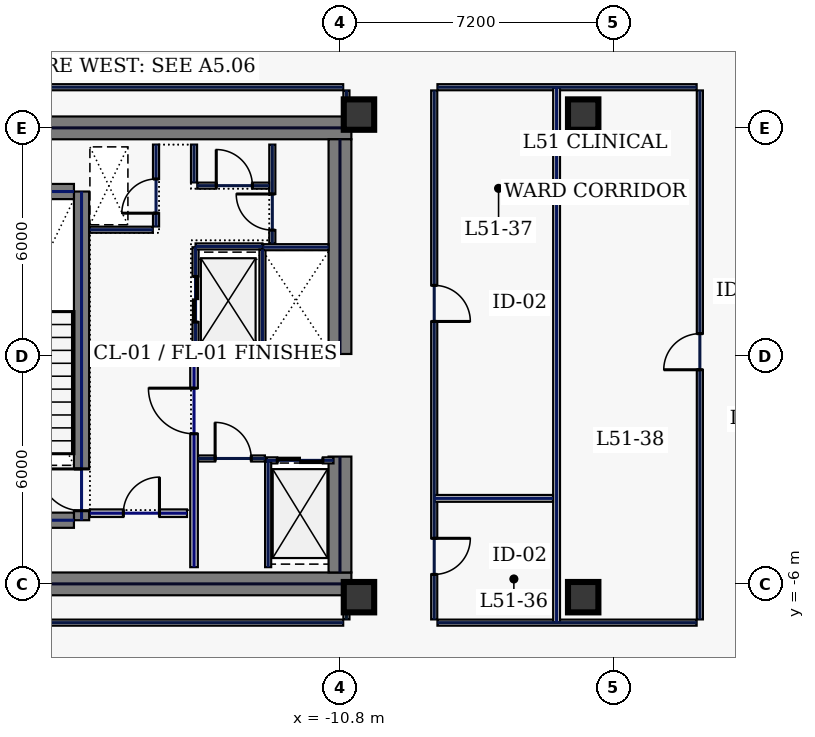
"""IFC4 building model, lengths in metres.
Left out: names, types, materials, properties, quantities, classifications, styles, units other than length and angle.
Written with IfcOpenShell. Run it as: python <this file> out.ifc"""

import sys

from ifc_helpers import new_model, si_unit, direction, frame, frame_2d, origin, origin_2d, place, context, subcontext, project, spatial, rectangle, hollow_rectangle, extrude, element, fill, save


model = new_model("IFC4")
c1 = context("Model", 3, precision=1e-05, world=origin(), true_north=direction((0.0, 1.0)))
c2 = subcontext(c1, "Body", "Model", "MODEL_VIEW")
j1 = project(units=[si_unit("LENGTHUNIT", "METRE"), si_unit("PLANEANGLEUNIT", "RADIAN")], contexts=[c1])
p1 = place(None, origin())
s1 = spatial("IfcSite", under=j1, at=p1, CompositionType="ELEMENT")
p2 = place(p1, origin())
s2 = spatial("IfcBuilding", under=s1, at=p2, CompositionType="ELEMENT")
p3 = place(p2, frame((0.0, 0.0, 222.2)))
s3 = spatial("IfcBuildingStorey", under=s2, at=p3, CompositionType="ELEMENT", Elevation=222.2)
for number, where, z_axis, x_axis in (
    (1, (-22.0, 6.0, 0.0), (0.0, 0.0, 1.0), (1.0, 0.0, 0.0)),
    (2, (-22.0, -6.0, 0.0), (0.0, 0.0, 1.0), (1.0, 0.0, 0.0)),
):
    element("IfcWall", number, at=place(p3, frame(where, z_axis=z_axis, x_axis=x_axis)), inside=s3, PredefinedType="SHEAR", context=c2, shape_type="SweptSolid", body=[
        extrude(rectangle(XDim=11.5, YDim=0.6, at=frame_2d((5.75, 0.0))), origin(), (0.0, 0.0, 1.0), 3.74),
    ])
p4 = place(p3, frame((-10.8, -5.7, 0.0), z_axis=(0.0, 0.0, 1.0), x_axis=(0.0, 1.0, 0.0)))
e3 = element("IfcWall", 3, at=p4, inside=s3, PredefinedType="SHEAR", context=c2, shape_type="SweptSolid", body=[
    extrude(rectangle(XDim=3.05, YDim=0.6, at=frame_2d((1.525, 0.0))), origin(), (0.0, 0.0, 1.0), 3.74),
])
p5 = place(p3, frame((-10.8, 0.05, 0.0), z_axis=(0.0, 0.0, 1.0), x_axis=(0.0, 1.0, 0.0)))
e4 = element("IfcWall", 4, at=p5, inside=s3, PredefinedType="SHEAR", context=c2, shape_type="SweptSolid", body=[
    extrude(rectangle(XDim=5.65, YDim=0.6, at=frame_2d((2.825, 0.0))), origin(), (0.0, 0.0, 1.0), 3.74),
])
p6 = place(p3, frame((-17.6, -4.325, 0.0), z_axis=(0.0, 0.0, 1.0), x_axis=(0.0, 1.0, 0.0)))
e5 = element("IfcWall", 5, at=p6, inside=s3, PredefinedType="SHEAR", context=c2, shape_type="SweptSolid", body=[
    extrude(rectangle(XDim=8.65, YDim=0.4, at=frame_2d((4.325, 0.0))), origin(), (0.0, 0.0, 1.0), 3.74),
])
p7 = place(p6, frame((0.25, 0.0, 0.0)))
e6 = element("IfcOpeningElement", 6, at=p7, cuts=e5, PredefinedType="OPENING", context=c2, shape_type="SweptSolid", body=[
    extrude(rectangle(XDim=1.1, YDim=2.2, at=frame_2d((0.55, 1.1))), frame((0.0, 0.21, 0.0), z_axis=(0.0, -1.0, 0.0), x_axis=(1.0, 0.0, 0.0)), (0.0, 0.0, 1.0), 0.42),
])
for number, where, z_axis, x_axis in (
    (7, (-21.2, -4.325, 0.0), (0.0, 0.0, 1.0), (1.0, 0.0, 0.0)),
    (8, (-21.2, 4.325, 0.0), (0.0, 0.0, 1.0), (1.0, 0.0, 0.0)),
):
    element("IfcWall", number, at=place(p3, frame(where, z_axis=z_axis, x_axis=x_axis)), inside=s3, PredefinedType="SHEAR", context=c2, shape_type="SweptSolid", body=[
        extrude(rectangle(XDim=3.4, YDim=0.4, at=frame_2d((1.7, 0.0))), origin(), (0.0, 0.0, 1.0), 3.74),
    ])
for number, where, z_axis, x_axis in (
    (9, (-10.3, -6.35, 0.0), (0.0, 0.0, 1.0), (1.0, 0.0, 0.0)),
    (10, (-10.3, 6.35, 0.0), (0.0, 0.0, 1.0), (1.0, 0.0, 0.0)),
    (11, (-4.4, -6.35, 0.0), (0.0, 0.0, 1.0), (1.0, 0.0, 0.0)),
    (12, (-4.4, 6.35, 0.0), (0.0, 0.0, 1.0), (1.0, 0.0, 0.0)),
):
    element("IfcColumn", number, at=place(p3, frame(where, z_axis=z_axis, x_axis=x_axis)), inside=s3, PredefinedType="COLUMN", context=c2, shape_type="SweptSolid", body=[
        extrude(hollow_rectangle(XDim=0.8, YDim=0.8, WallThickness=0.036, at=origin_2d()), origin(), (0.0, 0.0, 1.0), 3.74),
    ])
p8 = place(p3, frame((-14.6, 0.12, 0.0), z_axis=(0.0, 0.0, 1.0), x_axis=(0.0, 1.0, 0.0)))
e13 = element("IfcWall", 13, at=p8, inside=s3, PredefinedType="PARTITIONING", context=c2, shape_type="SweptSolid", body=[
    extrude(rectangle(XDim=2.74, YDim=0.16, at=frame_2d((1.37, 0.0))), origin(), (0.0, 0.0, 1.0), 3.74),
])
p9 = place(p8, frame((0.77, 0.0, 0.0)))
e14 = element("IfcOpeningElement", 14, at=p9, cuts=e13, PredefinedType="OPENING", context=c2, shape_type="SweptSolid", body=[
    extrude(rectangle(XDim=1.2, YDim=2.2, at=frame_2d((0.6, 1.1))), frame((0.0, 0.09, 0.0), z_axis=(0.0, -1.0, 0.0), x_axis=(1.0, 0.0, 0.0)), (0.0, 0.0, 1.0), 0.18),
])
for number, where, z_axis, x_axis in (
    (15, (-14.6, 0.1, 0.0), (0.0, 0.0, 1.0), (1.0, 0.0, 0.0)),
    (16, (-14.6, 2.88, 0.0), (0.0, 0.0, 1.0), (1.0, 0.0, 0.0)),
):
    element("IfcWall", number, at=place(p3, frame(where, z_axis=z_axis, x_axis=x_axis)), inside=s3, PredefinedType="PARTITIONING", context=c2, shape_type="SweptSolid", body=[
        extrude(rectangle(XDim=1.76, YDim=0.16, at=frame_2d((0.88, 0.0))), origin(), (0.0, 0.0, 1.0), 3.74),
    ])
p10 = place(p3, frame((-12.84, 0.18, 0.0), z_axis=(0.0, 0.0, 1.0), x_axis=(0.0, 1.0, 0.0)))
e17 = element("IfcWall", 17, at=p10, inside=s3, PredefinedType="PARTITIONING", context=c2, shape_type="SweptSolid", body=[
    extrude(rectangle(XDim=2.62, YDim=0.16, at=frame_2d((1.31, 0.0))), origin(), (0.0, 0.0, 1.0), 3.74),
])
p11 = place(p3, frame((-12.73, -2.75, 0.0), z_axis=(0.0, 0.0, 1.0), x_axis=(1.0, 0.0, 0.0)))
e18 = element("IfcWall", 18, at=p11, inside=s3, PredefinedType="PARTITIONING", context=c2, shape_type="SweptSolid", body=[
    extrude(rectangle(XDim=1.76, YDim=0.16, at=frame_2d((0.88, 0.0))), origin(), (0.0, 0.0, 1.0), 3.74),
])
p12 = place(p11, frame((0.28, 0.0, 0.0)))
e19 = element("IfcOpeningElement", 19, at=p12, cuts=e18, PredefinedType="OPENING", context=c2, shape_type="SweptSolid", body=[
    extrude(rectangle(XDim=1.2, YDim=2.2, at=frame_2d((0.6, 1.1))), frame((0.0, 0.09, 0.0), z_axis=(0.0, -1.0, 0.0), x_axis=(1.0, 0.0, 0.0)), (0.0, 0.0, 1.0), 0.18),
])
for number, where, z_axis, x_axis in (
    (20, (-12.82, 0.06, 0.0), (0.0, 0.0, 1.0), (1.0, 0.0, 0.0)),
    (21, (-12.82, 2.86, 0.0), (0.0, 0.0, 1.0), (1.0, 0.0, 0.0)),
):
    element("IfcWall", number, at=place(p3, frame(where, z_axis=z_axis, x_axis=x_axis)), inside=s3, PredefinedType="PARTITIONING", context=c2, shape_type="SweptSolid", body=[
        extrude(rectangle(XDim=1.72, YDim=0.16, at=frame_2d((0.86, 0.0))), origin(), (0.0, 0.0, 1.0), 3.74),
    ])
p13 = place(p3, frame((-15.64, 3.405, 0.0), z_axis=(0.0, 0.0, 1.0), x_axis=(0.0, 1.0, 0.0)))
e22 = element("IfcWall", 22, at=p13, inside=s3, PredefinedType="PARTITIONING", context=c2, shape_type="SweptSolid", body=[
    extrude(rectangle(XDim=2.155, YDim=0.16, at=frame_2d((1.078, 0.0))), origin(), (0.0, 0.0, 1.0), 3.74),
])
p14 = place(p13, frame((0.35, 0.0, 0.0)))
e23 = element("IfcOpeningElement", 23, at=p14, cuts=e22, PredefinedType="OPENING", context=c2, shape_type="SweptSolid", body=[
    extrude(rectangle(XDim=0.9, YDim=2.2, at=frame_2d((0.45, 1.1))), frame((0.0, 0.09, 0.0), z_axis=(0.0, -1.0, 0.0), x_axis=(1.0, 0.0, 0.0)), (0.0, 0.0, 1.0), 0.18),
])
p15 = place(p3, frame((-17.38, 3.32, 0.0), z_axis=(0.0, 0.0, 1.0), x_axis=(1.0, 0.0, 0.0)))
e24 = element("IfcWall", 24, at=p15, inside=s3, PredefinedType="PARTITIONING", context=c2, shape_type="SweptSolid", body=[
    extrude(rectangle(XDim=1.655, YDim=0.16, at=frame_2d((0.827, 0.0))), origin(), (0.0, 0.0, 1.0), 3.74),
])
p16 = place(p3, frame((-17.38, -4.14, 0.0), z_axis=(0.0, 0.0, 1.0), x_axis=(1.0, 0.0, 0.0)))
e25 = element("IfcWall", 25, at=p16, inside=s3, PredefinedType="SOLIDWALL", context=c2, shape_type="SweptSolid", body=[
    extrude(rectangle(XDim=2.555, YDim=0.2, at=frame_2d((1.277, 0.0))), origin(), (0.0, 0.0, 1.0), 3.74),
])
p17 = place(p16, frame((0.88, 0.0, 0.0)))
e26 = element("IfcOpeningElement", 26, at=p17, cuts=e25, PredefinedType="OPENING", context=c2, shape_type="SweptSolid", body=[
    extrude(rectangle(XDim=0.95, YDim=2.2, at=frame_2d((0.475, 1.1))), frame((0.0, 0.11, 0.0), z_axis=(0.0, -1.0, 0.0), x_axis=(1.0, 0.0, 0.0)), (0.0, 0.0, 1.0), 0.22),
])
p18 = place(p3, frame((-14.535, -2.7, 0.0), z_axis=(0.0, 0.0, 1.0), x_axis=(1.0, 0.0, 0.0)))
e27 = element("IfcWall", 27, at=p18, inside=s3, PredefinedType="PARTITIONING", context=c2, shape_type="SweptSolid", body=[
    extrude(rectangle(XDim=1.76, YDim=0.16, at=frame_2d((0.88, 0.0))), origin(), (0.0, 0.0, 1.0), 3.74),
])
p19 = place(p18, frame((0.45, 0.0, 0.0)))
e28 = element("IfcOpeningElement", 28, at=p19, cuts=e27, PredefinedType="OPENING", context=c2, shape_type="SweptSolid", body=[
    extrude(rectangle(XDim=0.95, YDim=2.2, at=frame_2d((0.475, 1.1))), frame((0.0, 0.09, 0.0), z_axis=(0.0, -1.0, 0.0), x_axis=(1.0, 0.0, 0.0)), (0.0, 0.0, 1.0), 0.18),
])
p20 = place(p3, frame((-12.69, -5.56, 0.0), z_axis=(0.0, 0.0, 1.0), x_axis=(0.0, 1.0, 0.0)))
e29 = element("IfcWall", 29, at=p20, inside=s3, PredefinedType="PARTITIONING", context=c2, shape_type="SweptSolid", body=[
    extrude(rectangle(XDim=2.775, YDim=0.16, at=frame_2d((1.388, 0.0))), origin(), (0.0, 0.0, 1.0), 3.74),
])
p21 = place(p3, frame((-12.58, 2.96, 0.0), z_axis=(0.0, 0.0, 1.0), x_axis=(0.0, 1.0, 0.0)))
e30 = element("IfcWall", 30, at=p21, inside=s3, PredefinedType="PARTITIONING", context=c2, shape_type="SweptSolid", body=[
    extrude(rectangle(XDim=2.6, YDim=0.16, at=frame_2d((1.3, 0.0))), origin(), (0.0, 0.0, 1.0), 3.74),
])
p22 = place(p21, frame((0.35, 0.0, 0.0)))
e31 = element("IfcOpeningElement", 31, at=p22, cuts=e30, PredefinedType="OPENING", context=c2, shape_type="SweptSolid", body=[
    extrude(rectangle(XDim=0.95, YDim=2.2, at=frame_2d((0.475, 1.1))), frame((0.0, 0.09, 0.0), z_axis=(0.0, -1.0, 0.0), x_axis=(1.0, 0.0, 0.0)), (0.0, 0.0, 1.0), 0.18),
])
p23 = place(p3, frame((-14.555, 4.48, 0.0), z_axis=(0.0, 0.0, 1.0), x_axis=(1.0, 0.0, 0.0)))
e32 = element("IfcWall", 32, at=p23, inside=s3, PredefinedType="PARTITIONING", context=c2, shape_type="SweptSolid", body=[
    extrude(rectangle(XDim=1.89, YDim=0.16, at=frame_2d((0.945, 0.0))), origin(), (0.0, 0.0, 1.0), 3.74),
])
p24 = place(p23, frame((0.5, 0.0, 0.0)))
e33 = element("IfcOpeningElement", 33, at=p24, cuts=e32, PredefinedType="OPENING", context=c2, shape_type="SweptSolid", body=[
    extrude(rectangle(XDim=0.95, YDim=2.2, at=frame_2d((0.475, 1.1))), frame((0.0, 0.09, 0.0), z_axis=(0.0, -1.0, 0.0), x_axis=(1.0, 0.0, 0.0)), (0.0, 0.0, 1.0), 0.18),
])
p25 = place(p3, frame((-14.64, 4.565, 0.0), z_axis=(0.0, 0.0, 1.0), x_axis=(0.0, 1.0, 0.0)))
e34 = element("IfcWall", 34, at=p25, inside=s3, PredefinedType="PARTITIONING", context=c2, shape_type="SweptSolid", body=[
    extrude(rectangle(XDim=0.995, YDim=0.16, at=frame_2d((0.498, 0.0))), origin(), (0.0, 0.0, 1.0), 3.74),
])
p26 = place(p3, frame((-14.64, -5.56, 0.0), z_axis=(0.0, 0.0, 1.0), x_axis=(0.0, 1.0, 0.0)))
e35 = element("IfcWall", 35, at=p26, inside=s3, PredefinedType="SOLIDWALL", context=c2, shape_type="SweptSolid", body=[
    extrude(rectangle(XDim=5.6, YDim=0.2, at=frame_2d((2.8, 0.0))), origin(), (0.0, 0.0, 1.0), 3.74),
])
p27 = place(p26, frame((3.51, 0.0, 0.0)))
e36 = element("IfcOpeningElement", 36, at=p27, cuts=e35, PredefinedType="OPENING", context=c2, shape_type="SweptSolid", body=[
    extrude(rectangle(XDim=1.2, YDim=2.2, at=frame_2d((0.6, 1.1))), frame((0.0, 0.11, 0.0), z_axis=(0.0, -1.0, 0.0), x_axis=(1.0, 0.0, 0.0)), (0.0, 0.0, 1.0), 0.22),
])
p28 = place(p3, frame((-24.815, -7.02, 0.0), z_axis=(0.0, 0.0, 1.0), x_axis=(1.0, 0.0, 0.0)))
e37 = element("IfcWall", 37, at=p28, inside=s3, PredefinedType="PARTITIONING", context=c2, shape_type="SweptSolid", body=[
    extrude(rectangle(XDim=14.1, YDim=0.16, at=frame_2d((7.05, 0.0))), origin(), (0.0, 0.0, 1.0), 3.74),
])
p29 = place(p3, frame((-10.63, -6.935, 0.0), z_axis=(0.0, 0.0, 1.0), x_axis=(0.0, 1.0, 0.0)))
e38 = element("IfcWall", 38, at=p29, inside=s3, PredefinedType="PARTITIONING", context=c2, shape_type="SweptSolid", body=[
    extrude(rectangle(XDim=0.515, YDim=0.16, at=frame_2d((0.258, 0.0))), origin(), (0.0, 0.0, 1.0), 1.535),
])
p30 = place(p3, frame((-10.63, 6.42, 0.0), z_axis=(0.0, 0.0, 1.0), x_axis=(0.0, 1.0, 0.0)))
e39 = element("IfcWall", 39, at=p30, inside=s3, PredefinedType="PARTITIONING", context=c2, shape_type="SweptSolid", body=[
    extrude(rectangle(XDim=0.565, YDim=0.16, at=frame_2d((0.283, 0.0))), origin(), (0.0, 0.0, 1.0), 3.74),
])
p31 = place(p3, frame((-10.715, 7.07, 0.0), z_axis=(0.0, 0.0, 1.0), x_axis=(-1.0, 0.0, 0.0)))
e40 = element("IfcWall", 40, at=p31, inside=s3, PredefinedType="PARTITIONING", context=c2, shape_type="SweptSolid", body=[
    extrude(rectangle(XDim=14.1, YDim=0.16, at=frame_2d((7.05, 0.0))), origin(), (0.0, 0.0, 1.0), 3.74),
])
p32 = place(p3, frame((-1.33, -6.935, 0.0), z_axis=(0.0, 0.0, 1.0), x_axis=(0.0, 1.0, 0.0)))
e41 = element("IfcWall", 41, at=p32, inside=s3, PredefinedType="PARTITIONING", context=c2, shape_type="SweptSolid", body=[
    extrude(rectangle(XDim=13.92, YDim=0.16, at=frame_2d((6.96, 0.0))), origin(), (0.0, 0.0, 1.0), 3.74),
])
p33 = place(p32, frame((6.57, 0.0, 0.0)))
e42 = element("IfcOpeningElement", 42, at=p33, cuts=e41, PredefinedType="OPENING", context=c2, shape_type="SweptSolid", body=[
    extrude(rectangle(XDim=0.95, YDim=2.2, at=frame_2d((0.475, 1.1))), frame((0.0, 0.09, 0.0), z_axis=(0.0, -1.0, 0.0), x_axis=(1.0, 0.0, 0.0)), (0.0, 0.0, 1.0), 0.18),
])
p34 = place(p3, frame((-1.415, 7.07, 0.0), z_axis=(0.0, 0.0, 1.0), x_axis=(-1.0, 0.0, 0.0)))
e43 = element("IfcWall", 43, at=p34, inside=s3, PredefinedType="PARTITIONING", context=c2, shape_type="SweptSolid", body=[
    extrude(rectangle(XDim=6.82, YDim=0.16, at=frame_2d((3.41, 0.0))), origin(), (0.0, 0.0, 1.0), 3.74),
])
p35 = place(p3, frame((-8.32, 6.985, 0.0), z_axis=(0.0, 0.0, 1.0), x_axis=(0.0, -1.0, 0.0)))
e44 = element("IfcWall", 44, at=p35, inside=s3, PredefinedType="PARTITIONING", context=c2, shape_type="SweptSolid", body=[
    extrude(rectangle(XDim=13.92, YDim=0.16, at=frame_2d((6.96, 0.0))), origin(), (0.0, 0.0, 1.0), 3.74),
])
p36 = place(p35, frame((11.786, 0.0, 0.0)))
e45 = element("IfcOpeningElement", 45, at=p36, cuts=e44, PredefinedType="OPENING", context=c2, shape_type="SweptSolid", body=[
    extrude(rectangle(XDim=0.95, YDim=2.2, at=frame_2d((0.475, 1.1))), frame((0.0, 0.09, 0.0), z_axis=(0.0, -1.0, 0.0), x_axis=(1.0, 0.0, 0.0)), (0.0, 0.0, 1.0), 0.18),
])
p37 = place(p35, frame((5.129, 0.0, 0.0)))
e46 = element("IfcOpeningElement", 46, at=p37, cuts=e44, PredefinedType="OPENING", context=c2, shape_type="SweptSolid", body=[
    extrude(rectangle(XDim=0.95, YDim=2.2, at=frame_2d((0.475, 1.1))), frame((0.0, 0.09, 0.0), z_axis=(0.0, -1.0, 0.0), x_axis=(1.0, 0.0, 0.0)), (0.0, 0.0, 1.0), 0.18),
])
p38 = place(p3, frame((-8.235, -7.02, 0.0), z_axis=(0.0, 0.0, 1.0), x_axis=(1.0, 0.0, 0.0)))
e47 = element("IfcWall", 47, at=p38, inside=s3, PredefinedType="PARTITIONING", context=c2, shape_type="SweptSolid", body=[
    extrude(rectangle(XDim=6.82, YDim=0.16, at=frame_2d((3.41, 0.0))), origin(), (0.0, 0.0, 1.0), 3.74),
])
p39 = place(p3, frame((-5.1, -7.015, 0.0), z_axis=(0.0, 0.0, 1.0), x_axis=(0.0, 1.0, 0.0)))
e48 = element("IfcWall", 48, at=p39, inside=s3, PredefinedType="PARTITIONING", context=c2, shape_type="SweptSolid", body=[
    extrude(rectangle(XDim=14.08, YDim=0.18, at=frame_2d((7.04, 0.0))), origin(), (0.0, 0.0, 1.0), 3.74),
])
p40 = place(p3, frame((-8.315, -3.75, 0.0), z_axis=(0.0, 0.0, 1.0), x_axis=(1.0, 0.0, 0.0)))
e49 = element("IfcWall", 49, at=p40, inside=s3, PredefinedType="PARTITIONING", context=c2, shape_type="SweptSolid", body=[
    extrude(rectangle(XDim=3.12, YDim=0.18, at=frame_2d((1.56, 0.0))), origin(), (0.0, 0.0, 1.0), 3.74),
])
p41 = place(p7, origin())
e50 = element("IfcDoor", 50, at=p41, inside=s3, OperationType="SINGLE_SWING_RIGHT", PredefinedType="DOOR", context=c2, shape_type="SweptSolid", body=[
    extrude(rectangle(XDim=1.1, YDim=2.2, at=frame_2d((0.55, 1.1))), frame((0.0, 0.025, 0.0), z_axis=(0.0, -1.0, 0.0), x_axis=(1.0, 0.0, 0.0)), (0.0, 0.0, 1.0), 0.05),
])
fill(e6, e50)
p42 = place(p9, origin())
e51 = element("IfcDoor", 51, at=p42, inside=s3, OperationType="SLIDING_TO_LEFT", PredefinedType="DOOR", context=c2, shape_type="SweptSolid", body=[
    extrude(rectangle(XDim=1.2, YDim=2.2, at=frame_2d((0.6, 1.1))), frame((0.0, 0.025, 0.0), z_axis=(0.0, -1.0, 0.0), x_axis=(1.0, 0.0, 0.0)), (0.0, 0.0, 1.0), 0.05),
])
fill(e14, e51)
p43 = place(p12, origin())
e52 = element("IfcDoor", 52, at=p43, inside=s3, OperationType="SLIDING_TO_LEFT", PredefinedType="DOOR", context=c2, shape_type="SweptSolid", body=[
    extrude(rectangle(XDim=1.2, YDim=2.2, at=frame_2d((0.6, 1.1))), frame((0.0, 0.025, 0.0), z_axis=(0.0, -1.0, 0.0), x_axis=(1.0, 0.0, 0.0)), (0.0, 0.0, 1.0), 0.05),
])
fill(e19, e52)
p44 = place(p14, origin())
e53 = element("IfcDoor", 53, at=p44, inside=s3, OperationType="SINGLE_SWING_LEFT", PredefinedType="DOOR", context=c2, shape_type="SweptSolid", body=[
    extrude(rectangle(XDim=0.9, YDim=2.2, at=frame_2d((0.45, 1.1))), frame((0.0, 0.025, 0.0), z_axis=(0.0, -1.0, 0.0), x_axis=(1.0, 0.0, 0.0)), (0.0, 0.0, 1.0), 0.05),
])
fill(e23, e53)
p45 = place(p17, origin())
e54 = element("IfcDoor", 54, at=p45, inside=s3, OperationType="SINGLE_SWING_RIGHT", PredefinedType="DOOR", context=c2, shape_type="SweptSolid", body=[
    extrude(rectangle(XDim=0.95, YDim=2.2, at=frame_2d((0.475, 1.1))), frame((0.0, 0.025, 0.0), z_axis=(0.0, -1.0, 0.0), x_axis=(1.0, 0.0, 0.0)), (0.0, 0.0, 1.0), 0.05),
])
fill(e26, e54)
p46 = place(p19, origin())
e55 = element("IfcDoor", 55, at=p46, inside=s3, OperationType="SINGLE_SWING_LEFT", PredefinedType="DOOR", context=c2, shape_type="SweptSolid", body=[
    extrude(rectangle(XDim=0.95, YDim=2.2, at=frame_2d((0.475, 1.1))), frame((0.0, 0.025, 0.0), z_axis=(0.0, -1.0, 0.0), x_axis=(1.0, 0.0, 0.0)), (0.0, 0.0, 1.0), 0.05),
])
fill(e28, e55)
p47 = place(p22, origin())
e56 = element("IfcDoor", 56, at=p47, inside=s3, OperationType="SINGLE_SWING_RIGHT", PredefinedType="DOOR", context=c2, shape_type="SweptSolid", body=[
    extrude(rectangle(XDim=0.95, YDim=2.2, at=frame_2d((0.475, 1.1))), frame((0.0, 0.025, 0.0), z_axis=(0.0, -1.0, 0.0), x_axis=(1.0, 0.0, 0.0)), (0.0, 0.0, 1.0), 0.05),
])
fill(e31, e56)
p48 = place(p24, origin())
e57 = element("IfcDoor", 57, at=p48, inside=s3, OperationType="SINGLE_SWING_LEFT", PredefinedType="DOOR", context=c2, shape_type="SweptSolid", body=[
    extrude(rectangle(XDim=0.95, YDim=2.2, at=frame_2d((0.475, 1.1))), frame((0.0, 0.025, 0.0), z_axis=(0.0, -1.0, 0.0), x_axis=(1.0, 0.0, 0.0)), (0.0, 0.0, 1.0), 0.05),
])
fill(e33, e57)
p49 = place(p27, origin())
e58 = element("IfcDoor", 58, at=p49, inside=s3, OperationType="SINGLE_SWING_RIGHT", PredefinedType="DOOR", context=c2, shape_type="SweptSolid", body=[
    extrude(rectangle(XDim=1.2, YDim=2.2, at=frame_2d((0.6, 1.1))), frame((0.0, 0.025, 0.0), z_axis=(0.0, -1.0, 0.0), x_axis=(1.0, 0.0, 0.0)), (0.0, 0.0, 1.0), 0.05),
])
fill(e36, e58)
p50 = place(p36, origin())
e59 = element("IfcDoor", 59, at=p50, inside=s3, OperationType="SINGLE_SWING_LEFT", PredefinedType="DOOR", context=c2, shape_type="SweptSolid", body=[
    extrude(rectangle(XDim=0.95, YDim=2.2, at=frame_2d((0.475, 1.1))), frame((0.0, 0.025, 0.0), z_axis=(0.0, -1.0, 0.0), x_axis=(1.0, 0.0, 0.0)), (0.0, 0.0, 1.0), 0.05),
])
fill(e45, e59)
p51 = place(p37, origin())
e60 = element("IfcDoor", 60, at=p51, inside=s3, OperationType="SINGLE_SWING_RIGHT", PredefinedType="DOOR", context=c2, shape_type="SweptSolid", body=[
    extrude(rectangle(XDim=0.95, YDim=2.2, at=frame_2d((0.475, 1.1))), frame((0.0, 0.025, 0.0), z_axis=(0.0, -1.0, 0.0), x_axis=(1.0, 0.0, 0.0)), (0.0, 0.0, 1.0), 0.05),
])
fill(e46, e60)
p52 = place(p33, origin())
e61 = element("IfcDoor", 61, at=p52, inside=s3, OperationType="SINGLE_SWING_LEFT", PredefinedType="DOOR", context=c2, shape_type="SweptSolid", body=[
    extrude(rectangle(XDim=0.95, YDim=2.2, at=frame_2d((0.475, 1.1))), frame((0.0, 0.025, 0.0), z_axis=(0.0, -1.0, 0.0), x_axis=(1.0, 0.0, 0.0)), (0.0, 0.0, 1.0), 0.05),
])
fill(e42, e61)
save(model, sys.argv[1])
